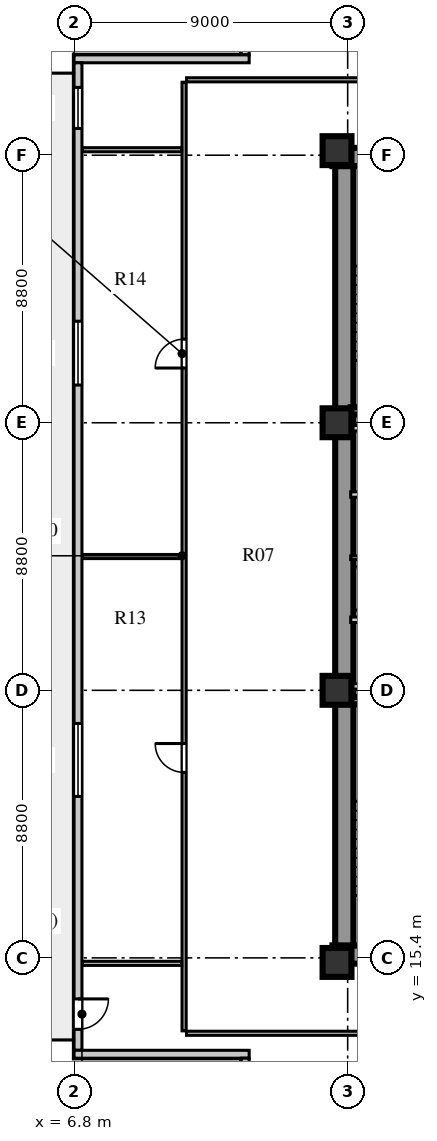
"""IFC4 building model, lengths in metres.
Left out: names, types, materials, properties, quantities, classifications, styles, units other than length and angle.
Written with IfcOpenShell. Run it as: python <this file> out.ifc"""

import sys

from ifc_helpers import new_model, si_unit, direction, frame, frame_2d, origin, origin_2d, place, context, subcontext, project, spatial, rectangle, extrude, element, fill, save


model = new_model("IFC4")
c1 = context("Model", 3, precision=1e-05, world=origin(), true_north=direction((0.0, 1.0)))
c2 = subcontext(c1, "Body", "Model", "MODEL_VIEW")
j1 = project(units=[si_unit("LENGTHUNIT", "METRE"), si_unit("PLANEANGLEUNIT", "RADIAN")], contexts=[c1])
p1 = place(None, origin())
s1 = spatial("IfcSite", under=j1, at=p1, CompositionType="ELEMENT")
p2 = place(p1, origin())
s2 = spatial("IfcBuilding", under=s1, at=p2, CompositionType="ELEMENT")
p3 = place(p2, frame((0.0, 0.0, 42.0)))
s3 = spatial("IfcBuildingStorey", under=s2, at=p3, CompositionType="ELEMENT", Elevation=42.0)
for number, where, z_axis, x_axis in (
    (1, (15.3, 15.51, 0.0), (0.0, 0.0, 1.0), (1.0, 0.0, 0.0)),
    (2, (15.3, 41.74, 0.0), (0.0, 0.0, 1.0), (1.0, 0.0, 0.0)),
):
    element("IfcWall", number, at=place(p3, frame(where, z_axis=z_axis, x_axis=x_axis)), inside=s3, PredefinedType="SHEAR", context=c2, shape_type="SweptSolid", body=[
        extrude(rectangle(XDim=9.88, YDim=0.6, at=frame_2d((4.94, 0.0))), origin(), (0.0, 0.0, 1.0), 3.72),
    ])
p4 = place(p3, frame((15.69, 15.81, 0.0), z_axis=(0.0, 0.0, 1.0), x_axis=(0.0, 1.0, 0.0)))
e3 = element("IfcWall", 3, at=p4, inside=s3, PredefinedType="SHEAR", context=c2, shape_type="SweptSolid", body=[
    extrude(rectangle(XDim=25.63, YDim=0.6, at=frame_2d((12.815, 0.0))), origin(), (0.0, 0.0, 1.0), 3.72),
])
for number, where, z_axis, x_axis in (
    (4, (15.45, 15.25, 0.0), (0.0, 0.0, 1.0), (1.0, 0.0, 0.0)),
    (5, (15.45, 24.2, 0.0), (0.0, 0.0, 1.0), (1.0, 0.0, 0.0)),
    (6, (15.45, 33.0, 0.0), (0.0, 0.0, 1.0), (1.0, 0.0, 0.0)),
    (7, (15.45, 41.95, 0.0), (0.0, 0.0, 1.0), (1.0, 0.0, 0.0)),
):
    element("IfcColumn", number, at=place(p3, frame(where, z_axis=z_axis, x_axis=x_axis)), inside=s3, PredefinedType="COLUMN", context=c2, shape_type="SweptSolid", body=[
        extrude(rectangle(XDim=0.95, YDim=0.95, at=origin_2d()), origin(), (0.0, 0.0, 1.0), 3.72),
    ])
p5 = place(p3, frame((12.43, 50.34, 0.0), z_axis=(0.0, 0.0, 1.0), x_axis=(0.0, -1.0, 0.0)))
e8 = element("IfcWall", 8, at=p5, inside=s3, PredefinedType="SOLIDWALL", context=c2, shape_type="SweptSolid", body=[
    extrude(rectangle(XDim=5.24, YDim=0.26, at=frame_2d((2.62, 0.0))), origin(), (0.0, 0.0, 1.0), 3.72),
])
p6 = place(p3, frame((12.56, 44.97, 0.0), z_axis=(0.0, 0.0, 1.0), x_axis=(-1.0, 0.0, 0.0)))
e9 = element("IfcWall", 9, at=p6, inside=s3, PredefinedType="SOLIDWALL", context=c2, shape_type="SweptSolid", body=[
    extrude(rectangle(XDim=5.76, YDim=0.26, at=frame_2d((2.88, 0.0))), origin(), (0.0, 0.0, 1.0), 3.72),
])
p7 = place(p3, frame((6.93, 44.84, 0.0), z_axis=(0.0, 0.0, 1.0), x_axis=(0.0, -1.0, 0.0)))
e10 = element("IfcWall", 10, at=p7, inside=s3, PredefinedType="SOLIDWALL", context=c2, shape_type="SweptSolid", body=[
    extrude(rectangle(XDim=32.48, YDim=0.26, at=frame_2d((16.24, 0.0))), origin(), (0.0, 0.0, 1.0), 3.72),
])
p8 = place(p7, frame((30.79, 0.0, 0.0)))
e11 = element("IfcOpeningElement", 11, at=p8, cuts=e10, PredefinedType="OPENING", context=c2, shape_type="SweptSolid", body=[
    extrude(rectangle(XDim=1.0, YDim=2.05, at=frame_2d((0.5, 1.025))), frame((0.0, 0.14, 0.0), z_axis=(0.0, -1.0, 0.0), x_axis=(1.0, 0.0, 0.0)), (0.0, 0.0, 1.0), 0.28),
])
p9 = place(p7, frame((21.73, 0.0, 0.8)))
e12 = element("IfcOpeningElement", 12, at=p9, cuts=e10, PredefinedType="OPENING", context=c2, shape_type="SweptSolid", body=[
    extrude(rectangle(XDim=2.4, YDim=2.05, at=frame_2d((1.2, 1.025))), frame((0.0, 0.14, 0.0), z_axis=(0.0, -1.0, 0.0), x_axis=(1.0, 0.0, 0.0)), (0.0, 0.0, 1.0), 0.28),
])
p10 = place(p7, frame((8.5, 0.0, 0.8)))
e13 = element("IfcOpeningElement", 13, at=p10, cuts=e10, PredefinedType="OPENING", context=c2, shape_type="SweptSolid", body=[
    extrude(rectangle(XDim=2.1, YDim=1.95, at=frame_2d((1.05, 0.975))), frame((0.0, 0.14, 0.0), z_axis=(0.0, -1.0, 0.0), x_axis=(1.0, 0.0, 0.0)), (0.0, 0.0, 1.0), 0.28),
])
p11 = place(p7, frame((0.81, 0.0, 0.8)))
e14 = element("IfcOpeningElement", 14, at=p11, cuts=e10, PredefinedType="OPENING", context=c2, shape_type="SweptSolid", body=[
    extrude(rectangle(XDim=1.35, YDim=1.9, at=frame_2d((0.675, 0.95))), frame((0.0, 0.14, 0.0), z_axis=(0.0, -1.0, 0.0), x_axis=(1.0, 0.0, 0.0)), (0.0, 0.0, 1.0), 0.28),
])
p12 = place(p3, frame((6.8, 12.23, 0.0), z_axis=(0.0, 0.0, 1.0), x_axis=(1.0, 0.0, 0.0)))
e15 = element("IfcWall", 15, at=p12, inside=s3, PredefinedType="SOLIDWALL", context=c2, shape_type="SweptSolid", body=[
    extrude(rectangle(XDim=5.76, YDim=0.26, at=frame_2d((2.88, 0.0))), origin(), (0.0, 0.0, 1.0), 3.72),
])
p13 = place(p3, frame((12.43, 12.1, 0.0), z_axis=(0.0, 0.0, 1.0), x_axis=(0.0, -1.0, 0.0)))
e16 = element("IfcWall", 16, at=p13, inside=s3, PredefinedType="SOLIDWALL", context=c2, shape_type="SweptSolid", body=[
    extrude(rectangle(XDim=5.24, YDim=0.26, at=frame_2d((2.62, 0.0))), origin(), (0.0, 0.0, 1.0), 3.72),
])
p14 = place(p3, frame((15.9, 23.86, 0.0), z_axis=(0.0, 0.0, 1.0), x_axis=(1.0, 0.0, 0.0)))
e17 = element("IfcWall", 17, at=p14, inside=s3, PredefinedType="SHEAR", context=c2, shape_type="SweptSolid", body=[
    extrude(rectangle(XDim=3.52, YDim=0.24, at=frame_2d((1.76, 0.0))), origin(), (0.0, 0.0, 1.0), 4.0),
])
p15 = place(p3, frame((15.9, 26.52, 0.0), z_axis=(0.0, 0.0, 1.0), x_axis=(1.0, 0.0, 0.0)))
e18 = element("IfcWall", 18, at=p15, inside=s3, PredefinedType="SOLIDWALL", context=c2, shape_type="SweptSolid", body=[
    extrude(rectangle(XDim=8.68, YDim=0.18, at=frame_2d((4.34, 0.0))), origin(), (0.0, 0.0, 1.0), 3.72),
])
p16 = place(p15, frame((1.76, 0.0, 0.0)))
e19 = element("IfcOpeningElement", 19, at=p16, cuts=e18, PredefinedType="OPENING", context=c2, shape_type="SweptSolid", body=[
    extrude(rectangle(XDim=1.0, YDim=2.1, at=frame_2d((0.5, 1.05))), frame((0.0, 0.1, 0.0), z_axis=(0.0, -1.0, 0.0), x_axis=(1.0, 0.0, 0.0)), (0.0, 0.0, 1.0), 0.2),
])
p17 = place(p15, frame((3.6, 0.0, 0.0)))
e20 = element("IfcOpeningElement", 20, at=p17, cuts=e18, PredefinedType="OPENING", context=c2, shape_type="SweptSolid", body=[
    extrude(rectangle(XDim=1.0, YDim=2.1, at=frame_2d((0.5, 1.05))), frame((0.0, 0.1, 0.0), z_axis=(0.0, -1.0, 0.0), x_axis=(1.0, 0.0, 0.0)), (0.0, 0.0, 1.0), 0.2),
])
p18 = place(p15, frame((5.44, 0.0, 0.0)))
e21 = element("IfcOpeningElement", 21, at=p18, cuts=e18, PredefinedType="OPENING", context=c2, shape_type="SweptSolid", body=[
    extrude(rectangle(XDim=1.0, YDim=2.1, at=frame_2d((0.5, 1.05))), frame((0.0, 0.1, 0.0), z_axis=(0.0, -1.0, 0.0), x_axis=(1.0, 0.0, 0.0)), (0.0, 0.0, 1.0), 0.2),
])
p19 = place(p15, frame((7.28, 0.0, 0.0)))
e22 = element("IfcOpeningElement", 22, at=p19, cuts=e18, PredefinedType="OPENING", context=c2, shape_type="SweptSolid", body=[
    extrude(rectangle(XDim=1.0, YDim=2.1, at=frame_2d((0.5, 1.05))), frame((0.0, 0.1, 0.0), z_axis=(0.0, -1.0, 0.0), x_axis=(1.0, 0.0, 0.0)), (0.0, 0.0, 1.0), 0.2),
])
p20 = place(p3, frame((15.9, 24.33, 0.0), z_axis=(0.0, 0.0, 1.0), x_axis=(1.0, 0.0, 0.0)))
e23 = element("IfcWall", 23, at=p20, inside=s3, PredefinedType="SOLIDWALL", context=c2, shape_type="SweptSolid", body=[
    extrude(rectangle(XDim=8.68, YDim=0.18, at=frame_2d((4.34, 0.0))), origin(), (0.0, 0.0, 1.0), 3.02),
])
p21 = place(p3, frame((15.9, 28.56, 0.0), z_axis=(0.0, 0.0, 1.0), x_axis=(1.0, 0.0, 0.0)))
e24 = element("IfcWall", 24, at=p21, inside=s3, PredefinedType="PARTITIONING", context=c2, shape_type="SweptSolid", body=[
    extrude(rectangle(XDim=1.2, YDim=0.12, at=frame_2d((0.6, 0.0))), origin(), (0.0, 0.0, 1.0), 3.72),
])
p22 = place(p3, frame((15.9, 30.64, 0.0), z_axis=(0.0, 0.0, 1.0), x_axis=(1.0, 0.0, 0.0)))
e25 = element("IfcWall", 25, at=p22, inside=s3, PredefinedType="SOLIDWALL", context=c2, shape_type="SweptSolid", body=[
    extrude(rectangle(XDim=8.68, YDim=0.18, at=frame_2d((4.34, 0.0))), origin(), (0.0, 0.0, 1.0), 3.72),
])
p23 = place(p22, frame((1.76, 0.0, 0.0)))
e26 = element("IfcOpeningElement", 26, at=p23, cuts=e25, PredefinedType="OPENING", context=c2, shape_type="SweptSolid", body=[
    extrude(rectangle(XDim=1.0, YDim=2.1, at=frame_2d((0.5, 1.05))), frame((0.0, 0.1, 0.0), z_axis=(0.0, -1.0, 0.0), x_axis=(1.0, 0.0, 0.0)), (0.0, 0.0, 1.0), 0.2),
])
p24 = place(p22, frame((3.6, 0.0, 0.0)))
e27 = element("IfcOpeningElement", 27, at=p24, cuts=e25, PredefinedType="OPENING", context=c2, shape_type="SweptSolid", body=[
    extrude(rectangle(XDim=1.0, YDim=2.1, at=frame_2d((0.5, 1.05))), frame((0.0, 0.1, 0.0), z_axis=(0.0, -1.0, 0.0), x_axis=(1.0, 0.0, 0.0)), (0.0, 0.0, 1.0), 0.2),
])
p25 = place(p22, frame((5.44, 0.0, 0.0)))
e28 = element("IfcOpeningElement", 28, at=p25, cuts=e25, PredefinedType="OPENING", context=c2, shape_type="SweptSolid", body=[
    extrude(rectangle(XDim=1.0, YDim=2.1, at=frame_2d((0.5, 1.05))), frame((0.0, 0.1, 0.0), z_axis=(0.0, -1.0, 0.0), x_axis=(1.0, 0.0, 0.0)), (0.0, 0.0, 1.0), 0.2),
])
p26 = place(p22, frame((7.28, 0.0, 0.0)))
e29 = element("IfcOpeningElement", 29, at=p26, cuts=e25, PredefinedType="OPENING", context=c2, shape_type="SweptSolid", body=[
    extrude(rectangle(XDim=1.0, YDim=2.1, at=frame_2d((0.5, 1.05))), frame((0.0, 0.1, 0.0), z_axis=(0.0, -1.0, 0.0), x_axis=(1.0, 0.0, 0.0)), (0.0, 0.0, 1.0), 0.2),
])
p27 = place(p3, frame((15.9, 32.82, 0.0), z_axis=(0.0, 0.0, 1.0), x_axis=(1.0, 0.0, 0.0)))
e30 = element("IfcWall", 30, at=p27, inside=s3, PredefinedType="SOLIDWALL", context=c2, shape_type="SweptSolid", body=[
    extrude(rectangle(XDim=8.68, YDim=0.18, at=frame_2d((4.34, 0.0))), origin(), (0.0, 0.0, 1.0), 3.02),
])
p28 = place(p3, frame((15.9, 33.39, 0.0), z_axis=(0.0, 0.0, 1.0), x_axis=(1.0, 0.0, 0.0)))
e31 = element("IfcWall", 31, at=p28, inside=s3, PredefinedType="SHEAR", context=c2, shape_type="SweptSolid", body=[
    extrude(rectangle(XDim=3.52, YDim=0.24, at=frame_2d((1.76, 0.0))), origin(), (0.0, 0.0, 1.0), 4.0),
])
p29 = place(p3, frame((10.42, 13.0, 0.0), z_axis=(0.0, 0.0, 1.0), x_axis=(0.0, 1.0, 0.0)))
e32 = element("IfcWall", 32, at=p29, inside=s3, PredefinedType="PARTITIONING", context=c2, shape_type="SweptSolid", body=[
    extrude(rectangle(XDim=31.2, YDim=0.135, at=frame_2d((15.6, 0.0))), origin(), (0.0, 0.0, 1.0), 3.72),
])
p30 = place(p29, frame((8.5, 0.0, 0.0)))
e33 = element("IfcOpeningElement", 33, at=p30, cuts=e32, PredefinedType="OPENING", context=c2, shape_type="SweptSolid", body=[
    extrude(rectangle(XDim=0.95, YDim=2.08, at=frame_2d((0.475, 1.04))), frame((0.0, 0.078, 0.0), z_axis=(0.0, -1.0, 0.0), x_axis=(1.0, 0.0, 0.0)), (0.0, 0.0, 1.0), 0.155),
])
p31 = place(p29, frame((21.8, 0.0, 0.0)))
e34 = element("IfcOpeningElement", 34, at=p31, cuts=e32, PredefinedType="OPENING", context=c2, shape_type="SweptSolid", body=[
    extrude(rectangle(XDim=0.95, YDim=2.08, at=frame_2d((0.475, 1.04))), frame((0.0, 0.078, 0.0), z_axis=(0.0, -1.0, 0.0), x_axis=(1.0, 0.0, 0.0)), (0.0, 0.0, 1.0), 0.155),
])
for number, where, z_axis, x_axis in (
    (35, (7.08, 15.22, 0.0), (0.0, 0.0, 1.0), (1.0, 0.0, 0.0)),
    (36, (7.08, 41.98, 0.0), (0.0, 0.0, 1.0), (1.0, 0.0, 0.0)),
):
    element("IfcWall", number, at=place(p3, frame(where, z_axis=z_axis, x_axis=x_axis)), inside=s3, PredefinedType="PARTITIONING", context=c2, shape_type="SweptSolid", body=[
        extrude(rectangle(XDim=3.26, YDim=0.135, at=frame_2d((1.63, 0.0))), origin(), (0.0, 0.0, 1.0), 3.22),
    ])
p32 = place(p3, frame((10.5, 12.92, 0.0), z_axis=(0.0, 0.0, 1.0), x_axis=(1.0, 0.0, 0.0)))
e37 = element("IfcWall", 37, at=p32, inside=s3, PredefinedType="PARTITIONING", context=c2, shape_type="SweptSolid", body=[
    extrude(rectangle(XDim=14.7, YDim=0.135, at=frame_2d((7.35, 0.0))), origin(), (0.0, 0.0, 1.0), 3.72),
])
p33 = place(p32, frame((6.2, 0.0, 0.0)))
e38 = element("IfcOpeningElement", 38, at=p33, cuts=e37, PredefinedType="OPENING", context=c2, shape_type="SweptSolid", body=[
    extrude(rectangle(XDim=1.0, YDim=2.08, at=frame_2d((0.5, 1.04))), frame((0.0, 0.078, 0.0), z_axis=(0.0, -1.0, 0.0), x_axis=(1.0, 0.0, 0.0)), (0.0, 0.0, 1.0), 0.155),
])
p34 = place(p3, frame((10.5, 44.28, 0.0), z_axis=(0.0, 0.0, 1.0), x_axis=(1.0, 0.0, 0.0)))
e39 = element("IfcWall", 39, at=p34, inside=s3, PredefinedType="PARTITIONING", context=c2, shape_type="SweptSolid", body=[
    extrude(rectangle(XDim=14.7, YDim=0.135, at=frame_2d((7.35, 0.0))), origin(), (0.0, 0.0, 1.0), 3.72),
])
p35 = place(p34, frame((6.2, 0.0, 0.0)))
e40 = element("IfcOpeningElement", 40, at=p35, cuts=e39, PredefinedType="OPENING", context=c2, shape_type="SweptSolid", body=[
    extrude(rectangle(XDim=1.0, YDim=2.08, at=frame_2d((0.5, 1.04))), frame((0.0, 0.078, 0.0), z_axis=(0.0, -1.0, 0.0), x_axis=(1.0, 0.0, 0.0)), (0.0, 0.0, 1.0), 0.155),
])
p36 = place(p3, frame((7.08, 28.6, 0.0), z_axis=(0.0, 0.0, 1.0), x_axis=(1.0, 0.0, 0.0)))
e41 = element("IfcWall", 41, at=p36, inside=s3, PredefinedType="PARTITIONING", context=c2, shape_type="SweptSolid", body=[
    extrude(rectangle(XDim=3.26, YDim=0.135, at=frame_2d((1.63, 0.0))), origin(), (0.0, 0.0, 1.0), 3.72),
])
p37 = place(p8, frame((1.0, 0.0, 0.0), z_axis=(0.0, 0.0, 1.0), x_axis=(-1.0, 0.0, 0.0)))
e42 = element("IfcDoor", 42, at=p37, inside=s3, OperationType="SINGLE_SWING_RIGHT", PredefinedType="DOOR", context=c2, shape_type="SweptSolid", body=[
    extrude(rectangle(XDim=1.0, YDim=2.05, at=frame_2d((0.5, 1.025))), frame((0.0, 0.025, 0.0), z_axis=(0.0, -1.0, 0.0), x_axis=(1.0, 0.0, 0.0)), (0.0, 0.0, 1.0), 0.05),
])
fill(e11, e42)
p38 = place(p9, origin())
e43 = element("IfcWindow", 43, at=p38, inside=s3, PartitioningType="SINGLE_PANEL", PredefinedType="WINDOW", context=c2, shape_type="SweptSolid", body=[
    extrude(rectangle(XDim=2.4, YDim=2.05, at=frame_2d((1.2, 1.025))), frame((0.0, 0.03, 0.0), z_axis=(0.0, -1.0, 0.0), x_axis=(1.0, 0.0, 0.0)), (0.0, 0.0, 1.0), 0.06),
])
fill(e12, e43)
p39 = place(p10, origin())
e44 = element("IfcWindow", 44, at=p39, inside=s3, PartitioningType="SINGLE_PANEL", PredefinedType="WINDOW", context=c2, shape_type="SweptSolid", body=[
    extrude(rectangle(XDim=2.1, YDim=1.95, at=frame_2d((1.05, 0.975))), frame((0.0, 0.03, 0.0), z_axis=(0.0, -1.0, 0.0), x_axis=(1.0, 0.0, 0.0)), (0.0, 0.0, 1.0), 0.06),
])
fill(e13, e44)
p40 = place(p11, origin())
e45 = element("IfcWindow", 45, at=p40, inside=s3, PartitioningType="SINGLE_PANEL", PredefinedType="WINDOW", context=c2, shape_type="SweptSolid", body=[
    extrude(rectangle(XDim=1.35, YDim=1.9, at=frame_2d((0.675, 0.95))), frame((0.0, 0.03, 0.0), z_axis=(0.0, -1.0, 0.0), x_axis=(1.0, 0.0, 0.0)), (0.0, 0.0, 1.0), 0.06),
])
fill(e14, e45)
p41 = place(p30, frame((0.95, 0.0, 0.0), z_axis=(0.0, 0.0, 1.0), x_axis=(-1.0, 0.0, 0.0)))
e46 = element("IfcDoor", 46, at=p41, inside=s3, OperationType="SINGLE_SWING_LEFT", PredefinedType="DOOR", context=c2, shape_type="SweptSolid", body=[
    extrude(rectangle(XDim=0.95, YDim=2.08, at=frame_2d((0.475, 1.04))), frame((0.0, 0.025, 0.0), z_axis=(0.0, -1.0, 0.0), x_axis=(1.0, 0.0, 0.0)), (0.0, 0.0, 1.0), 0.05),
])
fill(e33, e46)
p42 = place(p31, frame((0.95, 0.0, 0.0), z_axis=(0.0, 0.0, 1.0), x_axis=(-1.0, 0.0, 0.0)))
e47 = element("IfcDoor", 47, at=p42, inside=s3, OperationType="SINGLE_SWING_RIGHT", PredefinedType="DOOR", context=c2, shape_type="SweptSolid", body=[
    extrude(rectangle(XDim=0.95, YDim=2.08, at=frame_2d((0.475, 1.04))), frame((0.0, 0.025, 0.0), z_axis=(0.0, -1.0, 0.0), x_axis=(1.0, 0.0, 0.0)), (0.0, 0.0, 1.0), 0.05),
])
fill(e34, e47)
save(model, sys.argv[1])
